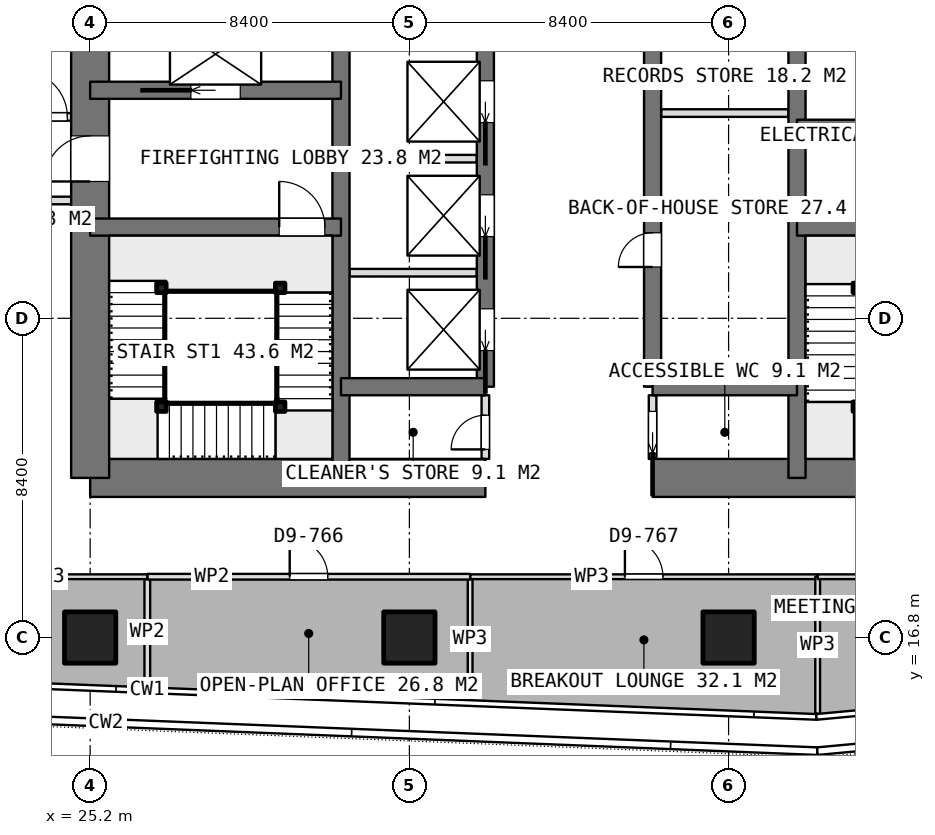
"""IFC4 building model, lengths in metres.
Left out: names, types, materials, properties, quantities, classifications, styles, units other than length and angle.
Written with IfcOpenShell. Run it as: python <this file> out.ifc"""

import sys

from ifc_helpers import new_model, si_unit, direction, frame, frame_2d, origin, origin_2d, place, context, subcontext, project, spatial, rectangle, extrude, element, fill, save


model = new_model("IFC4")
c1 = context("Model", 3, precision=1e-05, world=origin(), true_north=direction((0.0, 1.0)))
c2 = subcontext(c1, "Body", "Model", "MODEL_VIEW")
j1 = project(units=[si_unit("LENGTHUNIT", "METRE"), si_unit("PLANEANGLEUNIT", "RADIAN")], contexts=[c1])
p1 = place(None, origin())
s1 = spatial("IfcSite", under=j1, at=p1, CompositionType="ELEMENT")
p2 = place(p1, origin())
s2 = spatial("IfcBuilding", under=s1, at=p2, CompositionType="ELEMENT")
p3 = place(p2, frame((0.0, 0.0, 191.45)))
s3 = spatial("IfcBuildingStorey", under=s2, at=p3, CompositionType="ELEMENT", Elevation=191.45)
p4 = place(p3, frame((25.2, 21.0, 0.0), z_axis=(0.0, 0.0, 1.0), x_axis=(1.0, 0.0, 0.0)))
e1 = element("IfcWall", 1, at=p4, inside=s3, PredefinedType="SHEAR", context=c2, shape_type="SweptSolid", body=[
    extrude(rectangle(XDim=10.4, YDim=1.0, at=frame_2d((5.2, 0.0))), origin(), (0.0, 0.0, 1.0), 3.75),
])
p5 = place(p3, frame((40.0, 21.0, 0.0), z_axis=(0.0, 0.0, 1.0), x_axis=(1.0, 0.0, 0.0)))
e2 = element("IfcWall", 2, at=p5, inside=s3, PredefinedType="SHEAR", context=c2, shape_type="SweptSolid", body=[
    extrude(rectangle(XDim=10.4, YDim=1.0, at=frame_2d((5.2, 0.0))), origin(), (0.0, 0.0, 1.0), 3.75),
])
p6 = place(p3, frame((25.2, 21.0, 0.0), z_axis=(0.0, 0.0, 1.0), x_axis=(0.0, 1.0, 0.0)))
e3 = element("IfcWall", 3, at=p6, inside=s3, PredefinedType="SHEAR", context=c2, shape_type="SweptSolid", body=[
    extrude(rectangle(XDim=25.2, YDim=1.0, at=frame_2d((12.6, 0.0))), origin(), (0.0, 0.0, 1.0), 3.75),
])
p7 = place(p6, frame((7.8, 0.0, 0.0)))
e4 = element("IfcOpeningElement", 4, at=p7, cuts=e3, PredefinedType="OPENING", context=c2, shape_type="SweptSolid", body=[
    extrude(rectangle(XDim=1.2, YDim=2.1, at=frame_2d((0.6, 1.05))), frame((0.0, 0.51, 0.0), z_axis=(0.0, -1.0, 0.0), x_axis=(1.0, 0.0, 0.0)), (0.0, 0.0, 1.0), 1.02),
])
p8 = place(p6, frame((14.25, 0.0, 0.0)))
e5 = element("IfcOpeningElement", 5, at=p8, cuts=e3, PredefinedType="OPENING", context=c2, shape_type="SweptSolid", body=[
    extrude(rectangle(XDim=0.9, YDim=2.1, at=frame_2d((0.45, 1.05))), frame((0.0, 0.51, 0.0), z_axis=(0.0, -1.0, 0.0), x_axis=(1.0, 0.0, 0.0)), (0.0, 0.0, 1.0), 1.02),
])
p9 = place(p6, frame((16.85, 0.0, 0.0)))
e6 = element("IfcOpeningElement", 6, at=p9, cuts=e3, PredefinedType="OPENING", context=c2, shape_type="SweptSolid", body=[
    extrude(rectangle(XDim=0.9, YDim=2.1, at=frame_2d((0.45, 1.05))), frame((0.0, 0.51, 0.0), z_axis=(0.0, -1.0, 0.0), x_axis=(1.0, 0.0, 0.0)), (0.0, 0.0, 1.0), 1.02),
])
p10 = place(p6, frame((19.025, 0.0, 0.0)))
e7 = element("IfcOpeningElement", 7, at=p10, cuts=e3, PredefinedType="OPENING", context=c2, shape_type="SweptSolid", body=[
    extrude(rectangle(XDim=1.2, YDim=2.1, at=frame_2d((0.6, 1.05))), frame((0.0, 0.51, 0.0), z_axis=(0.0, -1.0, 0.0), x_axis=(1.0, 0.0, 0.0)), (0.0, 0.0, 1.0), 1.02),
])
for number, where, z_axis, x_axis in (
    (8, (31.8, 21.0, 0.0), (0.0, 0.0, 1.0), (0.0, 1.0, 0.0)),
    (9, (43.8, 21.0, 0.0), (0.0, 0.0, 1.0), (0.0, 1.0, 0.0)),
):
    element("IfcWall", number, at=place(p3, frame(where, z_axis=z_axis, x_axis=x_axis)), inside=s3, PredefinedType="SHEAR", context=c2, shape_type="SweptSolid", body=[
        extrude(rectangle(XDim=25.2, YDim=0.45, at=frame_2d((12.6, 0.0))), origin(), (0.0, 0.0, 1.0), 3.75),
    ])
p11 = place(p3, frame((35.6, 23.4, 0.0), z_axis=(0.0, 0.0, 1.0), x_axis=(0.0, 1.0, 0.0)))
e10 = element("IfcWall", 10, at=p11, inside=s3, PredefinedType="SHEAR", context=c2, shape_type="SweptSolid", body=[
    extrude(rectangle(XDim=18.0, YDim=0.45, at=frame_2d((9.0, 0.0))), origin(), (0.0, 0.0, 1.0), 3.75),
])
p12 = place(p11, frame((0.95, 0.0, 0.0)))
e11 = element("IfcOpeningElement", 11, at=p12, cuts=e10, PredefinedType="OPENING", context=c2, shape_type="SweptSolid", body=[
    extrude(rectangle(XDim=1.1, YDim=2.1, at=frame_2d((0.55, 1.05))), frame((0.0, 0.235, 0.0), z_axis=(0.0, -1.0, 0.0), x_axis=(1.0, 0.0, 0.0)), (0.0, 0.0, 1.0), 0.47),
])
p13 = place(p11, frame((3.95, 0.0, 0.0)))
e12 = element("IfcOpeningElement", 12, at=p13, cuts=e10, PredefinedType="OPENING", context=c2, shape_type="SweptSolid", body=[
    extrude(rectangle(XDim=1.1, YDim=2.1, at=frame_2d((0.55, 1.05))), frame((0.0, 0.235, 0.0), z_axis=(0.0, -1.0, 0.0), x_axis=(1.0, 0.0, 0.0)), (0.0, 0.0, 1.0), 0.47),
])
p14 = place(p11, frame((6.95, 0.0, 0.0)))
e13 = element("IfcOpeningElement", 13, at=p14, cuts=e10, PredefinedType="OPENING", context=c2, shape_type="SweptSolid", body=[
    extrude(rectangle(XDim=1.1, YDim=2.1, at=frame_2d((0.55, 1.05))), frame((0.0, 0.235, 0.0), z_axis=(0.0, -1.0, 0.0), x_axis=(1.0, 0.0, 0.0)), (0.0, 0.0, 1.0), 0.47),
])
p15 = place(p11, frame((9.95, 0.0, 0.0)))
e14 = element("IfcOpeningElement", 14, at=p15, cuts=e10, PredefinedType="OPENING", context=c2, shape_type="SweptSolid", body=[
    extrude(rectangle(XDim=1.1, YDim=2.1, at=frame_2d((0.55, 1.05))), frame((0.0, 0.235, 0.0), z_axis=(0.0, -1.0, 0.0), x_axis=(1.0, 0.0, 0.0)), (0.0, 0.0, 1.0), 0.47),
])
p16 = place(p11, frame((12.95, 0.0, 0.0)))
e15 = element("IfcOpeningElement", 15, at=p16, cuts=e10, PredefinedType="OPENING", context=c2, shape_type="SweptSolid", body=[
    extrude(rectangle(XDim=1.1, YDim=2.1, at=frame_2d((0.55, 1.05))), frame((0.0, 0.235, 0.0), z_axis=(0.0, -1.0, 0.0), x_axis=(1.0, 0.0, 0.0)), (0.0, 0.0, 1.0), 0.47),
])
p17 = place(p11, frame((15.95, 0.0, 0.0)))
e16 = element("IfcOpeningElement", 16, at=p17, cuts=e10, PredefinedType="OPENING", context=c2, shape_type="SweptSolid", body=[
    extrude(rectangle(XDim=1.1, YDim=2.1, at=frame_2d((0.55, 1.05))), frame((0.0, 0.235, 0.0), z_axis=(0.0, -1.0, 0.0), x_axis=(1.0, 0.0, 0.0)), (0.0, 0.0, 1.0), 0.47),
])
p18 = place(p3, frame((40.0, 23.4, 0.0), z_axis=(0.0, 0.0, 1.0), x_axis=(0.0, 1.0, 0.0)))
e17 = element("IfcWall", 17, at=p18, inside=s3, PredefinedType="SHEAR", context=c2, shape_type="SweptSolid", body=[
    extrude(rectangle(XDim=18.0, YDim=0.45, at=frame_2d((9.0, 0.0))), origin(), (0.0, 0.0, 1.0), 3.75),
])
p19 = place(p18, frame((3.15, 0.0, 0.0)))
e18 = element("IfcOpeningElement", 18, at=p19, cuts=e17, PredefinedType="OPENING", context=c2, shape_type="SweptSolid", body=[
    extrude(rectangle(XDim=0.9, YDim=2.1, at=frame_2d((0.45, 1.05))), frame((0.0, 0.235, 0.0), z_axis=(0.0, -1.0, 0.0), x_axis=(1.0, 0.0, 0.0)), (0.0, 0.0, 1.0), 0.47),
])
p20 = place(p18, frame((9.15, 0.0, 0.0)))
e19 = element("IfcOpeningElement", 19, at=p20, cuts=e17, PredefinedType="OPENING", context=c2, shape_type="SweptSolid", body=[
    extrude(rectangle(XDim=0.9, YDim=2.1, at=frame_2d((0.45, 1.05))), frame((0.0, 0.235, 0.0), z_axis=(0.0, -1.0, 0.0), x_axis=(1.0, 0.0, 0.0)), (0.0, 0.0, 1.0), 0.47),
])
for number, where, z_axis, x_axis in (
    (20, (31.8, 23.4, 0.0), (0.0, 0.0, 1.0), (1.0, 0.0, 0.0)),
    (21, (40.0, 23.4, 0.0), (0.0, 0.0, 1.0), (1.0, 0.0, 0.0)),
):
    element("IfcWall", number, at=place(p3, frame(where, z_axis=z_axis, x_axis=x_axis)), inside=s3, PredefinedType="SHEAR", context=c2, shape_type="SweptSolid", body=[
        extrude(rectangle(XDim=3.8, YDim=0.45, at=frame_2d((1.9, 0.0))), origin(), (0.0, 0.0, 1.0), 3.75),
    ])
p21 = place(p3, frame((25.2, 27.6, 0.0), z_axis=(0.0, 0.0, 1.0), x_axis=(1.0, 0.0, 0.0)))
e22 = element("IfcWall", 22, at=p21, inside=s3, PredefinedType="SHEAR", context=c2, shape_type="SweptSolid", body=[
    extrude(rectangle(XDim=6.6, YDim=0.45, at=frame_2d((3.3, 0.0))), origin(), (0.0, 0.0, 1.0), 3.75),
])
p22 = place(p21, frame((4.975, 0.0, 0.0)))
e23 = element("IfcOpeningElement", 23, at=p22, cuts=e22, PredefinedType="OPENING", context=c2, shape_type="SweptSolid", body=[
    extrude(rectangle(XDim=1.2, YDim=2.1, at=frame_2d((0.6, 1.05))), frame((0.0, 0.235, 0.0), z_axis=(0.0, -1.0, 0.0), x_axis=(1.0, 0.0, 0.0)), (0.0, 0.0, 1.0), 0.47),
])
p23 = place(p3, frame((25.2, 31.2, 0.0), z_axis=(0.0, 0.0, 1.0), x_axis=(1.0, 0.0, 0.0)))
e24 = element("IfcWall", 24, at=p23, inside=s3, PredefinedType="SHEAR", context=c2, shape_type="SweptSolid", body=[
    extrude(rectangle(XDim=6.6, YDim=0.45, at=frame_2d((3.3, 0.0))), origin(), (0.0, 0.0, 1.0), 3.75),
])
p24 = place(p23, frame((2.65, 0.0, 0.0)))
e25 = element("IfcOpeningElement", 25, at=p24, cuts=e24, PredefinedType="OPENING", context=c2, shape_type="SweptSolid", body=[
    extrude(rectangle(XDim=1.3, YDim=2.1, at=frame_2d((0.65, 1.05))), frame((0.0, 0.235, 0.0), z_axis=(0.0, -1.0, 0.0), x_axis=(1.0, 0.0, 0.0)), (0.0, 0.0, 1.0), 0.47),
])
for number, where, z_axis, x_axis in (
    (26, (43.8, 27.6, 0.0), (0.0, 0.0, 1.0), (1.0, 0.0, 0.0)),
    (27, (43.8, 30.2, 0.0), (0.0, 0.0, 1.0), (1.0, 0.0, 0.0)),
):
    element("IfcWall", number, at=place(p3, frame(where, z_axis=z_axis, x_axis=x_axis)), inside=s3, PredefinedType="SHEAR", context=c2, shape_type="SweptSolid", body=[
        extrude(rectangle(XDim=6.6, YDim=0.45, at=frame_2d((3.3, 0.0))), origin(), (0.0, 0.0, 1.0), 3.75),
    ])
for number, where, z_axis, x_axis in (
    (28, (25.2, 16.8, 0.0), (0.0, 0.0, 1.0), (1.0, 0.0, 0.0)),
    (29, (33.6, 16.8, 0.0), (0.0, 0.0, 1.0), (1.0, 0.0, 0.0)),
    (30, (42.0, 16.8, 0.0), (0.0, 0.0, 1.0), (1.0, 0.0, 0.0)),
):
    element("IfcColumn", number, at=place(p3, frame(where, z_axis=z_axis, x_axis=x_axis)), inside=s3, PredefinedType="COLUMN", context=c2, shape_type="SweptSolid", body=[
        extrude(rectangle(XDim=1.35, YDim=1.35, at=origin_2d()), origin(), (0.0, 0.0, 1.0), 3.75),
    ])
for number, where, z_axis, x_axis in (
    (31, (32.025, 26.4, 0.0), (0.0, 0.0, 1.0), (1.0, 0.0, 0.0)),
    (32, (32.025, 29.4, 0.0), (0.0, 0.0, 1.0), (1.0, 0.0, 0.0)),
):
    element("IfcWall", number, at=place(p3, frame(where, z_axis=z_axis, x_axis=x_axis)), inside=s3, PredefinedType="PARTITIONING", context=c2, shape_type="SweptSolid", body=[
        extrude(rectangle(XDim=3.35, YDim=0.2, at=frame_2d((1.675, 0.0))), origin(), (0.0, 0.0, 1.0), 3.5),
    ])
p25 = place(p3, frame((40.0, 21.5, 0.0), z_axis=(0.0, 0.0, 1.0), x_axis=(0.0, 1.0, 0.0)))
e33 = element("IfcWall", 33, at=p25, inside=s3, PredefinedType="PARTITIONING", context=c2, shape_type="SweptSolid", body=[
    extrude(rectangle(XDim=1.675, YDim=0.2, at=frame_2d((0.837, 0.0))), origin(), (0.0, 0.0, 1.0), 3.5),
])
p26 = place(p25, frame((0.15, 0.0, 0.0)))
e34 = element("IfcOpeningElement", 34, at=p26, cuts=e33, PredefinedType="OPENING", context=c2, shape_type="SweptSolid", body=[
    extrude(rectangle(XDim=1.1, YDim=2.1, at=frame_2d((0.55, 1.05))), frame((0.0, 0.11, 0.0), z_axis=(0.0, -1.0, 0.0), x_axis=(1.0, 0.0, 0.0)), (0.0, 0.0, 1.0), 0.22),
])
p27 = place(p3, frame((35.6, 21.5, 0.0), z_axis=(0.0, 0.0, 1.0), x_axis=(0.0, 1.0, 0.0)))
e35 = element("IfcWall", 35, at=p27, inside=s3, PredefinedType="PARTITIONING", context=c2, shape_type="SweptSolid", body=[
    extrude(rectangle(XDim=1.675, YDim=0.2, at=frame_2d((0.837, 0.0))), origin(), (0.0, 0.0, 1.0), 3.5),
])
p28 = place(p27, frame((0.25, 0.0, 0.0)))
e36 = element("IfcOpeningElement", 36, at=p28, cuts=e35, PredefinedType="OPENING", context=c2, shape_type="SweptSolid", body=[
    extrude(rectangle(XDim=0.9, YDim=2.1, at=frame_2d((0.45, 1.05))), frame((0.0, 0.11, 0.0), z_axis=(0.0, -1.0, 0.0), x_axis=(1.0, 0.0, 0.0)), (0.0, 0.0, 1.0), 0.22),
])
p29 = place(p3, frame((40.225, 30.6, 0.0), z_axis=(0.0, 0.0, 1.0), x_axis=(1.0, 0.0, 0.0)))
e37 = element("IfcWall", 37, at=p29, inside=s3, PredefinedType="PARTITIONING", context=c2, shape_type="SweptSolid", body=[
    extrude(rectangle(XDim=3.35, YDim=0.2, at=frame_2d((1.675, 0.0))), origin(), (0.0, 0.0, 1.0), 3.5),
])
p30 = place(p3, frame((35.199, 15.126, 0.0), z_axis=(0.0, 0.0, 1.0), x_axis=(0.0, 1.0, 0.0)))
e38 = element("IfcWall", 38, at=p30, inside=s3, PredefinedType="PARTITIONING", context=c2, shape_type="SweptSolid", body=[
    extrude(rectangle(XDim=3.274, YDim=0.125, at=frame_2d((1.637, 0.0))), origin(), (0.0, 0.0, 1.0), 3.5),
])
p31 = place(p3, frame((35.199, 18.4, 0.0), z_axis=(0.0, 0.0, 1.0), x_axis=(1.0, 0.0, 0.0)))
e39 = element("IfcWall", 39, at=p31, inside=s3, PredefinedType="PARTITIONING", context=c2, shape_type="SweptSolid", body=[
    extrude(rectangle(XDim=9.145, YDim=0.125, at=frame_2d((4.573, 0.0))), origin(), (0.0, 0.0, 1.0), 3.5),
])
p32 = place(p31, frame((4.073, 0.0, 0.0)))
e40 = element("IfcOpeningElement", 40, at=p32, cuts=e39, PredefinedType="OPENING", context=c2, shape_type="SweptSolid", body=[
    extrude(rectangle(XDim=1.0, YDim=2.1, at=frame_2d((0.5, 1.05))), frame((0.0, 0.073, 0.0), z_axis=(0.0, -1.0, 0.0), x_axis=(1.0, 0.0, 0.0)), (0.0, 0.0, 1.0), 0.145),
])
p33 = place(p3, frame((44.344, 18.4, 0.0), z_axis=(0.0, 0.0, 1.0), x_axis=(0.0, -1.0, 0.0)))
e41 = element("IfcWall", 41, at=p33, inside=s3, PredefinedType="PARTITIONING", context=c2, shape_type="SweptSolid", body=[
    extrude(rectangle(XDim=3.605, YDim=0.125, at=frame_2d((1.802, 0.0))), origin(), (0.0, 0.0, 1.0), 3.5),
])
p34 = place(p3, frame((44.345, 18.4, 0.0), z_axis=(0.0, 0.0, 1.0), x_axis=(1.0, 0.0, 0.0)))
e42 = element("IfcWall", 42, at=p34, inside=s3, PredefinedType="PARTITIONING", context=c2, shape_type="SweptSolid", body=[
    extrude(rectangle(XDim=6.063, YDim=0.125, at=frame_2d((3.031, 0.0))), origin(), (0.0, 0.0, 1.0), 3.5),
])
p35 = place(p34, frame((2.532, 0.0, 0.0)))
e43 = element("IfcOpeningElement", 43, at=p35, cuts=e42, PredefinedType="OPENING", context=c2, shape_type="SweptSolid", body=[
    extrude(rectangle(XDim=1.0, YDim=2.1, at=frame_2d((0.5, 1.05))), frame((0.0, 0.073, 0.0), z_axis=(0.0, -1.0, 0.0), x_axis=(1.0, 0.0, 0.0)), (0.0, 0.0, 1.0), 0.145),
])
p36 = place(p3, frame((26.704, 15.495, 0.0), z_axis=(0.0, 0.0, 1.0), x_axis=(0.0, 1.0, 0.0)))
e44 = element("IfcWall", 44, at=p36, inside=s3, PredefinedType="PARTITIONING", context=c2, shape_type="SweptSolid", body=[
    extrude(rectangle(XDim=2.905, YDim=0.15, at=frame_2d((1.452, 0.0))), origin(), (0.0, 0.0, 1.0), 3.5),
])
p37 = place(p3, frame((26.704, 18.4, 0.0), z_axis=(0.0, 0.0, 1.0), x_axis=(1.0, 0.0, 0.0)))
e45 = element("IfcWall", 45, at=p37, inside=s3, PredefinedType="PARTITIONING", context=c2, shape_type="SweptSolid", body=[
    extrude(rectangle(XDim=8.495, YDim=0.15, at=frame_2d((4.248, 0.0))), origin(), (0.0, 0.0, 1.0), 3.5),
])
p38 = place(p37, frame((3.747, 0.0, 0.0)))
e46 = element("IfcOpeningElement", 46, at=p38, cuts=e45, PredefinedType="OPENING", context=c2, shape_type="SweptSolid", body=[
    extrude(rectangle(XDim=1.0, YDim=2.1, at=frame_2d((0.5, 1.05))), frame((0.0, 0.085, 0.0), z_axis=(0.0, -1.0, 0.0), x_axis=(1.0, 0.0, 0.0)), (0.0, 0.0, 1.0), 0.17),
])
p39 = place(p3, frame((19.2, 18.4, 0.0), z_axis=(0.0, 0.0, 1.0), x_axis=(1.0, 0.0, 0.0)))
e47 = element("IfcWall", 47, at=p39, inside=s3, PredefinedType="PARTITIONING", context=c2, shape_type="SweptSolid", body=[
    extrude(rectangle(XDim=7.503, YDim=0.125, at=frame_2d((3.751, 0.0))), origin(), (0.0, 0.0, 1.0), 3.5),
])
p40 = place(p39, frame((1.644, 0.0, 0.0)))
e48 = element("IfcOpeningElement", 48, at=p40, cuts=e47, PredefinedType="OPENING", context=c2, shape_type="SweptSolid", body=[
    extrude(rectangle(XDim=1.8, YDim=2.1, at=frame_2d((0.9, 1.05))), frame((0.0, 0.073, 0.0), z_axis=(0.0, -1.0, 0.0), x_axis=(1.0, 0.0, 0.0)), (0.0, 0.0, 1.0), 0.145),
])
for number, where, z_axis, x_axis in (
    (49, (30.2, 26.0, 0.0), (0.0, 0.0, 1.0), (1.0, 0.0, 0.0)),
    (50, (30.2, 22.875, 0.0), (0.0, 0.0, 1.0), (1.0, 0.0, 0.0)),
    (51, (27.075, 22.875, 0.0), (0.0, 0.0, 1.0), (1.0, 0.0, 0.0)),
    (52, (27.075, 26.0, 0.0), (0.0, 0.0, 1.0), (1.0, 0.0, 0.0)),
    (53, (45.4, 22.875, 0.0), (0.0, 0.0, 1.0), (1.0, 0.0, 0.0)),
    (54, (45.4, 26.0, 0.0), (0.0, 0.0, 1.0), (1.0, 0.0, 0.0)),
):
    element("IfcColumn", number, at=place(p3, frame(where, z_axis=z_axis, x_axis=x_axis)), inside=s3, PredefinedType="COLUMN", context=c2, shape_type="SweptSolid", body=[
        extrude(rectangle(XDim=0.25, YDim=0.25, at=origin_2d()), origin(), (0.0, 0.0, 1.0), 3.75),
    ])
p41 = place(p3, frame((16.95, 30.5, 0.0), z_axis=(0.0, 0.0, 1.0), x_axis=(1.0, 0.0, 0.0)))
e55 = element("IfcWall", 55, at=p41, inside=s3, PredefinedType="PARTITIONING", context=c2, shape_type="SweptSolid", body=[
    extrude(rectangle(XDim=8.25, YDim=0.2, at=frame_2d((4.125, 0.0))), origin(), (0.0, 0.0, 1.0), 3.5),
])
p42 = place(p41, frame((6.45, 0.0, 0.0)))
e56 = element("IfcOpeningElement", 56, at=p42, cuts=e55, PredefinedType="OPENING", context=c2, shape_type="SweptSolid", body=[
    extrude(rectangle(XDim=1.2, YDim=2.1, at=frame_2d((0.6, 1.05))), frame((0.0, 0.11, 0.0), z_axis=(0.0, -1.0, 0.0), x_axis=(1.0, 0.0, 0.0)), (0.0, 0.0, 1.0), 0.22),
])
p43 = place(p3, frame((16.95, 28.3, 0.0), z_axis=(0.0, 0.0, 1.0), x_axis=(1.0, 0.0, 0.0)))
e57 = element("IfcWall", 57, at=p43, inside=s3, PredefinedType="PARTITIONING", context=c2, shape_type="SweptSolid", body=[
    extrude(rectangle(XDim=8.25, YDim=0.2, at=frame_2d((4.125, 0.0))), origin(), (0.0, 0.0, 1.0), 3.5),
])
p44 = place(p7, origin())
e58 = element("IfcDoor", 58, at=p44, inside=s3, OperationType="SINGLE_SWING_LEFT", PredefinedType="DOOR", context=c2, shape_type="SweptSolid", body=[
    extrude(rectangle(XDim=1.2, YDim=2.1, at=frame_2d((0.6, 1.05))), frame((0.0, 0.025, 0.0), z_axis=(0.0, -1.0, 0.0), x_axis=(1.0, 0.0, 0.0)), (0.0, 0.0, 1.0), 0.05),
])
fill(e4, e58)
p45 = place(p26, origin())
e59 = element("IfcDoor", 59, at=p45, inside=s3, OperationType="SLIDING_TO_LEFT", PredefinedType="DOOR", context=c2, shape_type="SweptSolid", body=[
    extrude(rectangle(XDim=1.1, YDim=2.1, at=frame_2d((0.55, 1.05))), frame((0.0, 0.025, 0.0), z_axis=(0.0, -1.0, 0.0), x_axis=(1.0, 0.0, 0.0)), (0.0, 0.0, 1.0), 0.05),
])
fill(e34, e59)
p46 = place(p28, origin())
e60 = element("IfcDoor", 60, at=p46, inside=s3, OperationType="SINGLE_SWING_LEFT", PredefinedType="DOOR", context=c2, shape_type="SweptSolid", body=[
    extrude(rectangle(XDim=0.9, YDim=2.1, at=frame_2d((0.45, 1.05))), frame((0.0, 0.025, 0.0), z_axis=(0.0, -1.0, 0.0), x_axis=(1.0, 0.0, 0.0)), (0.0, 0.0, 1.0), 0.05),
])
fill(e36, e60)
p47 = place(p19, origin())
e61 = element("IfcDoor", 61, at=p47, inside=s3, OperationType="SINGLE_SWING_LEFT", PredefinedType="DOOR", context=c2, shape_type="SweptSolid", body=[
    extrude(rectangle(XDim=0.9, YDim=2.1, at=frame_2d((0.45, 1.05))), frame((0.0, 0.025, 0.0), z_axis=(0.0, -1.0, 0.0), x_axis=(1.0, 0.0, 0.0)), (0.0, 0.0, 1.0), 0.05),
])
fill(e18, e61)
p48 = place(p12, origin())
e62 = element("IfcDoor", 62, at=p48, inside=s3, OperationType="SLIDING_TO_LEFT", PredefinedType="USERDEFINED", context=c2, shape_type="SweptSolid", body=[
    extrude(rectangle(XDim=1.1, YDim=2.1, at=frame_2d((0.55, 1.05))), frame((0.0, 0.025, 0.0), z_axis=(0.0, -1.0, 0.0), x_axis=(1.0, 0.0, 0.0)), (0.0, 0.0, 1.0), 0.05),
])
fill(e11, e62)
p49 = place(p13, origin())
e63 = element("IfcDoor", 63, at=p49, inside=s3, OperationType="SLIDING_TO_LEFT", PredefinedType="USERDEFINED", context=c2, shape_type="SweptSolid", body=[
    extrude(rectangle(XDim=1.1, YDim=2.1, at=frame_2d((0.55, 1.05))), frame((0.0, 0.025, 0.0), z_axis=(0.0, -1.0, 0.0), x_axis=(1.0, 0.0, 0.0)), (0.0, 0.0, 1.0), 0.05),
])
fill(e12, e63)
p50 = place(p14, origin())
e64 = element("IfcDoor", 64, at=p50, inside=s3, OperationType="SLIDING_TO_LEFT", PredefinedType="USERDEFINED", context=c2, shape_type="SweptSolid", body=[
    extrude(rectangle(XDim=1.1, YDim=2.1, at=frame_2d((0.55, 1.05))), frame((0.0, 0.025, 0.0), z_axis=(0.0, -1.0, 0.0), x_axis=(1.0, 0.0, 0.0)), (0.0, 0.0, 1.0), 0.05),
])
fill(e13, e64)
p51 = place(p24, origin())
e65 = element("IfcDoor", 65, at=p51, inside=s3, OperationType="SLIDING_TO_LEFT", PredefinedType="USERDEFINED", context=c2, shape_type="SweptSolid", body=[
    extrude(rectangle(XDim=1.3, YDim=2.1, at=frame_2d((0.65, 1.05))), frame((0.0, 0.025, 0.0), z_axis=(0.0, -1.0, 0.0), x_axis=(1.0, 0.0, 0.0)), (0.0, 0.0, 1.0), 0.05),
])
fill(e25, e65)
p52 = place(p32, origin())
e66 = element("IfcDoor", 66, at=p52, inside=s3, OperationType="SINGLE_SWING_LEFT", PredefinedType="DOOR", context=c2, shape_type="SweptSolid", body=[
    extrude(rectangle(XDim=1.0, YDim=2.1, at=frame_2d((0.5, 1.05))), frame((0.0, 0.025, 0.0), z_axis=(0.0, -1.0, 0.0), x_axis=(1.0, 0.0, 0.0)), (0.0, 0.0, 1.0), 0.05),
])
fill(e40, e66)
p53 = place(p38, origin())
e67 = element("IfcDoor", 67, at=p53, inside=s3, OperationType="SINGLE_SWING_LEFT", PredefinedType="DOOR", context=c2, shape_type="SweptSolid", body=[
    extrude(rectangle(XDim=1.0, YDim=2.1, at=frame_2d((0.5, 1.05))), frame((0.0, 0.025, 0.0), z_axis=(0.0, -1.0, 0.0), x_axis=(1.0, 0.0, 0.0)), (0.0, 0.0, 1.0), 0.05),
])
fill(e46, e67)
p54 = place(p22, origin())
e68 = element("IfcDoor", 68, at=p54, inside=s3, OperationType="SINGLE_SWING_RIGHT", PredefinedType="DOOR", context=c2, shape_type="SweptSolid", body=[
    extrude(rectangle(XDim=1.2, YDim=2.1, at=frame_2d((0.6, 1.05))), frame((0.0, 0.025, 0.0), z_axis=(0.0, -1.0, 0.0), x_axis=(1.0, 0.0, 0.0)), (0.0, 0.0, 1.0), 0.05),
])
fill(e23, e68)
p55 = place(p42, origin())
e69 = element("IfcDoor", 69, at=p55, inside=s3, OperationType="SINGLE_SWING_LEFT", PredefinedType="DOOR", context=c2, shape_type="SweptSolid", body=[
    extrude(rectangle(XDim=1.2, YDim=2.1, at=frame_2d((0.6, 1.05))), frame((0.0, 0.025, 0.0), z_axis=(0.0, -1.0, 0.0), x_axis=(1.0, 0.0, 0.0)), (0.0, 0.0, 1.0), 0.05),
])
fill(e56, e69)
save(model, sys.argv[1])
